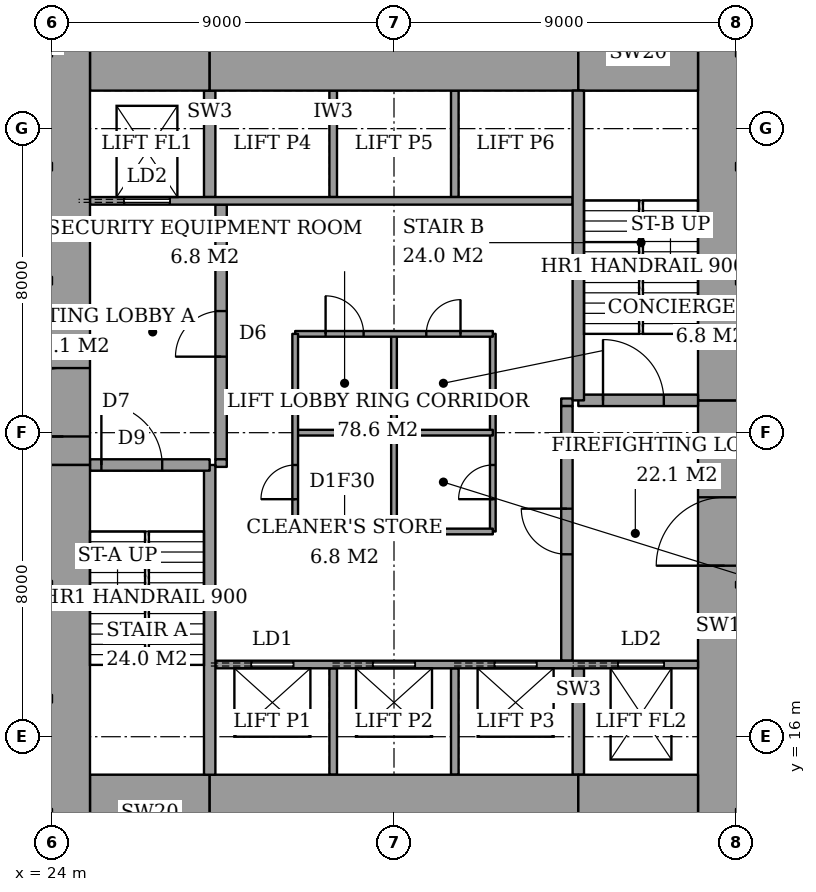
"""IFC4 building model, lengths in metres.
Left out: names, types, materials, properties, quantities, classifications, styles, units other than length and angle.
Written with IfcOpenShell. Run it as: python <this file> out.ifc"""

import sys

from ifc_helpers import new_model, si_unit, direction, frame, frame_2d, origin, place, context, subcontext, project, spatial, rectangle, extrude, element, fill, save


model = new_model("IFC4")
c1 = context("Model", 3, precision=1e-05, world=origin(), true_north=direction((0.0, 1.0)))
c2 = subcontext(c1, "Body", "Model", "MODEL_VIEW")
j1 = project(units=[si_unit("LENGTHUNIT", "METRE"), si_unit("PLANEANGLEUNIT", "RADIAN")], contexts=[c1])
p1 = place(None, origin())
s1 = spatial("IfcSite", under=j1, at=p1, CompositionType="ELEMENT")
p2 = place(p1, origin())
s2 = spatial("IfcBuilding", under=s1, at=p2, CompositionType="ELEMENT")
p3 = place(p2, frame((0.0, 0.0, 21.0)))
s3 = spatial("IfcBuildingStorey", under=s2, at=p3, CompositionType="ELEMENT", Elevation=21.0)
p4 = place(p3, frame((25.0, 14.0, 0.0), z_axis=(0.0, 0.0, 1.0), x_axis=(1.0, 0.0, 0.0)))
e1 = element("IfcWall", 1, at=p4, inside=s3, PredefinedType="SHEAR", context=c2, shape_type="SweptSolid", body=[
    extrude(rectangle(XDim=3.15, YDim=2.0, at=frame_2d((1.575, 0.0))), origin(), (0.0, 0.0, 1.0), 5.0),
])
p5 = place(p3, frame((28.15, 14.0, 0.0), z_axis=(0.0, 0.0, 1.0), x_axis=(1.0, 0.0, 0.0)))
e2 = element("IfcWall", 2, at=p5, inside=s3, PredefinedType="SHEAR", context=c2, shape_type="SweptSolid", body=[
    extrude(rectangle(XDim=9.7, YDim=2.0, at=frame_2d((4.85, 0.0))), origin(), (0.0, 0.0, 1.0), 5.0),
])
for number, where, z_axis, x_axis in (
    (3, (37.85, 14.0, 0.0), (0.0, 0.0, 1.0), (1.0, 0.0, 0.0)),
    (4, (25.0, 34.0, 0.0), (0.0, 0.0, 1.0), (1.0, 0.0, 0.0)),
):
    element("IfcWall", number, at=place(p3, frame(where, z_axis=z_axis, x_axis=x_axis)), inside=s3, PredefinedType="SHEAR", context=c2, shape_type="SweptSolid", body=[
        extrude(rectangle(XDim=3.15, YDim=2.0, at=frame_2d((1.575, 0.0))), origin(), (0.0, 0.0, 1.0), 5.0),
    ])
p6 = place(p3, frame((28.15, 34.0, 0.0), z_axis=(0.0, 0.0, 1.0), x_axis=(1.0, 0.0, 0.0)))
e5 = element("IfcWall", 5, at=p6, inside=s3, PredefinedType="SHEAR", context=c2, shape_type="SweptSolid", body=[
    extrude(rectangle(XDim=9.7, YDim=2.0, at=frame_2d((4.85, 0.0))), origin(), (0.0, 0.0, 1.0), 5.0),
])
p7 = place(p3, frame((37.85, 34.0, 0.0), z_axis=(0.0, 0.0, 1.0), x_axis=(1.0, 0.0, 0.0)))
e6 = element("IfcWall", 6, at=p7, inside=s3, PredefinedType="SHEAR", context=c2, shape_type="SweptSolid", body=[
    extrude(rectangle(XDim=3.15, YDim=2.0, at=frame_2d((1.575, 0.0))), origin(), (0.0, 0.0, 1.0), 5.0),
])
p8 = place(p3, frame((24.3, 13.0, 0.0), z_axis=(0.0, 0.0, 1.0), x_axis=(0.0, 1.0, 0.0)))
e7 = element("IfcWall", 7, at=p8, inside=s3, PredefinedType="SHEAR", context=c2, shape_type="SweptSolid", body=[
    extrude(rectangle(XDim=10.15, YDim=1.4, at=frame_2d((5.075, 0.0))), origin(), (0.0, 0.0, 1.0), 5.0),
])
p9 = place(p3, frame((24.3, 23.15, 0.0), z_axis=(0.0, 0.0, 1.0), x_axis=(0.0, 1.0, 0.0)))
e8 = element("IfcWall", 8, at=p9, inside=s3, PredefinedType="SHEAR", context=c2, shape_type="SweptSolid", body=[
    extrude(rectangle(XDim=11.85, YDim=1.4, at=frame_2d((5.925, 0.0))), origin(), (0.0, 0.0, 1.0), 5.0),
])
p10 = place(p9, frame((0.75, 0.0, 0.0)))
e9 = element("IfcOpeningElement", 9, at=p10, cuts=e8, PredefinedType="OPENING", context=c2, shape_type="SweptSolid", body=[
    extrude(rectangle(XDim=1.8, YDim=2.4, at=frame_2d((0.9, 1.2))), frame((0.0, 0.71, 0.0), z_axis=(0.0, -1.0, 0.0), x_axis=(1.0, 0.0, 0.0)), (0.0, 0.0, 1.0), 1.42),
])
p11 = place(p3, frame((41.7, 13.0, 0.0), z_axis=(0.0, 0.0, 1.0), x_axis=(0.0, 1.0, 0.0)))
e10 = element("IfcWall", 10, at=p11, inside=s3, PredefinedType="SHEAR", context=c2, shape_type="SweptSolid", body=[
    extrude(rectangle(XDim=11.85, YDim=1.4, at=frame_2d((5.925, 0.0))), origin(), (0.0, 0.0, 1.0), 5.0),
])
p12 = place(p11, frame((7.5, 0.0, 0.0)))
e11 = element("IfcOpeningElement", 11, at=p12, cuts=e10, PredefinedType="OPENING", context=c2, shape_type="SweptSolid", body=[
    extrude(rectangle(XDim=1.8, YDim=2.4, at=frame_2d((0.9, 1.2))), frame((0.0, 0.71, 0.0), z_axis=(0.0, -1.0, 0.0), x_axis=(1.0, 0.0, 0.0)), (0.0, 0.0, 1.0), 1.42),
])
p13 = place(p3, frame((41.7, 24.85, 0.0), z_axis=(0.0, 0.0, 1.0), x_axis=(0.0, 1.0, 0.0)))
e12 = element("IfcWall", 12, at=p13, inside=s3, PredefinedType="SHEAR", context=c2, shape_type="SweptSolid", body=[
    extrude(rectangle(XDim=10.15, YDim=1.4, at=frame_2d((5.075, 0.0))), origin(), (0.0, 0.0, 1.0), 5.0),
])
p14 = place(p3, frame((28.15, 15.0, 0.0), z_axis=(0.0, 0.0, 1.0), x_axis=(0.0, 1.0, 0.0)))
e13 = element("IfcWall", 13, at=p14, inside=s3, PredefinedType="SHEAR", context=c2, shape_type="SweptSolid", body=[
    extrude(rectangle(XDim=8.15, YDim=0.3, at=frame_2d((4.075, 0.0))), origin(), (0.0, 0.0, 1.0), 5.0),
])
p15 = place(p3, frame((25.0, 23.15, 0.0), z_axis=(0.0, 0.0, 1.0), x_axis=(1.0, 0.0, 0.0)))
e14 = element("IfcWall", 14, at=p15, inside=s3, PredefinedType="SHEAR", context=c2, shape_type="SweptSolid", body=[
    extrude(rectangle(XDim=3.15, YDim=0.3, at=frame_2d((1.575, 0.0))), origin(), (0.0, 0.0, 1.0), 5.0),
])
p16 = place(p15, frame((0.3, 0.0, 0.0)))
e15 = element("IfcOpeningElement", 15, at=p16, cuts=e14, PredefinedType="OPENING", context=c2, shape_type="SweptSolid", body=[
    extrude(rectangle(XDim=1.6, YDim=2.1, at=frame_2d((0.8, 1.05))), frame((0.0, 0.16, 0.0), z_axis=(0.0, -1.0, 0.0), x_axis=(1.0, 0.0, 0.0)), (0.0, 0.0, 1.0), 0.32),
])
p17 = place(p3, frame((37.85, 24.85, 0.0), z_axis=(0.0, 0.0, 1.0), x_axis=(0.0, 1.0, 0.0)))
e16 = element("IfcWall", 16, at=p17, inside=s3, PredefinedType="SHEAR", context=c2, shape_type="SweptSolid", body=[
    extrude(rectangle(XDim=8.15, YDim=0.3, at=frame_2d((4.075, 0.0))), origin(), (0.0, 0.0, 1.0), 5.0),
])
p18 = place(p3, frame((37.85, 24.85, 0.0), z_axis=(0.0, 0.0, 1.0), x_axis=(1.0, 0.0, 0.0)))
e17 = element("IfcWall", 17, at=p18, inside=s3, PredefinedType="SHEAR", context=c2, shape_type="SweptSolid", body=[
    extrude(rectangle(XDim=3.15, YDim=0.3, at=frame_2d((1.575, 0.0))), origin(), (0.0, 0.0, 1.0), 5.0),
])
p19 = place(p18, frame((0.65, 0.0, 0.0)))
e18 = element("IfcOpeningElement", 18, at=p19, cuts=e17, PredefinedType="OPENING", context=c2, shape_type="SweptSolid", body=[
    extrude(rectangle(XDim=1.6, YDim=2.1, at=frame_2d((0.8, 1.05))), frame((0.0, 0.16, 0.0), z_axis=(0.0, -1.0, 0.0), x_axis=(1.0, 0.0, 0.0)), (0.0, 0.0, 1.0), 0.32),
])
p20 = place(p3, frame((28.45, 23.3, 0.0), z_axis=(0.0, 0.0, 1.0), x_axis=(0.0, 1.0, 0.0)))
e19 = element("IfcWall", 19, at=p20, inside=s3, PredefinedType="PARTITIONING", context=c2, shape_type="SweptSolid", body=[
    extrude(rectangle(XDim=6.7, YDim=0.3, at=frame_2d((3.35, 0.0))), origin(), (0.0, 0.0, 1.0), 5.0),
])
p21 = place(p20, frame((2.7, 0.0, 0.0)))
e20 = element("IfcOpeningElement", 20, at=p21, cuts=e19, PredefinedType="OPENING", context=c2, shape_type="SweptSolid", body=[
    extrude(rectangle(XDim=1.2, YDim=2.1, at=frame_2d((0.6, 1.05))), frame((0.0, 0.16, 0.0), z_axis=(0.0, -1.0, 0.0), x_axis=(1.0, 0.0, 0.0)), (0.0, 0.0, 1.0), 0.32),
])
p22 = place(p3, frame((37.55, 18.0, 0.0), z_axis=(0.0, 0.0, 1.0), x_axis=(0.0, 1.0, 0.0)))
e21 = element("IfcWall", 21, at=p22, inside=s3, PredefinedType="PARTITIONING", context=c2, shape_type="SweptSolid", body=[
    extrude(rectangle(XDim=6.7, YDim=0.3, at=frame_2d((3.35, 0.0))), origin(), (0.0, 0.0, 1.0), 5.0),
])
p23 = place(p22, frame((2.8, 0.0, 0.0)))
e22 = element("IfcOpeningElement", 22, at=p23, cuts=e21, PredefinedType="OPENING", context=c2, shape_type="SweptSolid", body=[
    extrude(rectangle(XDim=1.2, YDim=2.1, at=frame_2d((0.6, 1.05))), frame((0.0, 0.16, 0.0), z_axis=(0.0, -1.0, 0.0), x_axis=(1.0, 0.0, 0.0)), (0.0, 0.0, 1.0), 0.32),
])
p24 = place(p3, frame((28.3, 17.9, 0.0), z_axis=(0.0, 0.0, 1.0), x_axis=(1.0, 0.0, 0.0)))
e23 = element("IfcWall", 23, at=p24, inside=s3, PredefinedType="PARTITIONING", context=c2, shape_type="SweptSolid", body=[
    extrude(rectangle(XDim=12.7, YDim=0.2, at=frame_2d((6.35, 0.0))), origin(), (0.0, 0.0, 1.0), 5.0),
])
p25 = place(p24, frame((0.95, 0.0, 0.0)))
e24 = element("IfcOpeningElement", 24, at=p25, cuts=e23, PredefinedType="OPENING", context=c2, shape_type="SweptSolid", body=[
    extrude(rectangle(XDim=1.1, YDim=2.1, at=frame_2d((0.55, 1.05))), frame((0.0, 0.11, 0.0), z_axis=(0.0, -1.0, 0.0), x_axis=(1.0, 0.0, 0.0)), (0.0, 0.0, 1.0), 0.22),
])
p26 = place(p24, frame((4.15, 0.0, 0.0)))
e25 = element("IfcOpeningElement", 25, at=p26, cuts=e23, PredefinedType="OPENING", context=c2, shape_type="SweptSolid", body=[
    extrude(rectangle(XDim=1.1, YDim=2.1, at=frame_2d((0.55, 1.05))), frame((0.0, 0.11, 0.0), z_axis=(0.0, -1.0, 0.0), x_axis=(1.0, 0.0, 0.0)), (0.0, 0.0, 1.0), 0.22),
])
p27 = place(p24, frame((7.35, 0.0, 0.0)))
e26 = element("IfcOpeningElement", 26, at=p27, cuts=e23, PredefinedType="OPENING", context=c2, shape_type="SweptSolid", body=[
    extrude(rectangle(XDim=1.1, YDim=2.1, at=frame_2d((0.55, 1.05))), frame((0.0, 0.11, 0.0), z_axis=(0.0, -1.0, 0.0), x_axis=(1.0, 0.0, 0.0)), (0.0, 0.0, 1.0), 0.22),
])
p28 = place(p24, frame((10.6, 0.0, 0.0)))
e27 = element("IfcOpeningElement", 27, at=p28, cuts=e23, PredefinedType="OPENING", context=c2, shape_type="SweptSolid", body=[
    extrude(rectangle(XDim=1.2, YDim=2.1, at=frame_2d((0.6, 1.05))), frame((0.0, 0.11, 0.0), z_axis=(0.0, -1.0, 0.0), x_axis=(1.0, 0.0, 0.0)), (0.0, 0.0, 1.0), 0.22),
])
p29 = place(p3, frame((25.0, 30.1, 0.0), z_axis=(0.0, 0.0, 1.0), x_axis=(1.0, 0.0, 0.0)))
e28 = element("IfcWall", 28, at=p29, inside=s3, PredefinedType="PARTITIONING", context=c2, shape_type="SweptSolid", body=[
    extrude(rectangle(XDim=12.7, YDim=0.2, at=frame_2d((6.35, 0.0))), origin(), (0.0, 0.0, 1.0), 5.0),
])
p30 = place(p29, frame((0.9, 0.0, 0.0)))
e29 = element("IfcOpeningElement", 29, at=p30, cuts=e28, PredefinedType="OPENING", context=c2, shape_type="SweptSolid", body=[
    extrude(rectangle(XDim=1.2, YDim=2.1, at=frame_2d((0.6, 1.05))), frame((0.0, 0.11, 0.0), z_axis=(0.0, -1.0, 0.0), x_axis=(1.0, 0.0, 0.0)), (0.0, 0.0, 1.0), 0.22),
])
for number, where, z_axis, x_axis in (
    (30, (31.4, 15.0, 0.0), (0.0, 0.0, 1.0), (0.0, 1.0, 0.0)),
    (31, (34.6, 15.0, 0.0), (0.0, 0.0, 1.0), (0.0, 1.0, 0.0)),
):
    element("IfcWall", number, at=place(p3, frame(where, z_axis=z_axis, x_axis=x_axis)), inside=s3, PredefinedType="PARTITIONING", context=c2, shape_type="SweptSolid", body=[
        extrude(rectangle(XDim=2.8, YDim=0.2, at=frame_2d((1.4, 0.0))), origin(), (0.0, 0.0, 1.0), 5.0),
    ])
p31 = place(p3, frame((37.85, 15.0, 0.0), z_axis=(0.0, 0.0, 1.0), x_axis=(0.0, 1.0, 0.0)))
e32 = element("IfcWall", 32, at=p31, inside=s3, PredefinedType="SHEAR", context=c2, shape_type="SweptSolid", body=[
    extrude(rectangle(XDim=2.8, YDim=0.3, at=frame_2d((1.4, 0.0))), origin(), (0.0, 0.0, 1.0), 5.0),
])
for number, where, z_axis, x_axis in (
    (33, (31.4, 30.2, 0.0), (0.0, 0.0, 1.0), (0.0, 1.0, 0.0)),
    (34, (34.6, 30.2, 0.0), (0.0, 0.0, 1.0), (0.0, 1.0, 0.0)),
):
    element("IfcWall", number, at=place(p3, frame(where, z_axis=z_axis, x_axis=x_axis)), inside=s3, PredefinedType="PARTITIONING", context=c2, shape_type="SweptSolid", body=[
        extrude(rectangle(XDim=2.8, YDim=0.2, at=frame_2d((1.4, 0.0))), origin(), (0.0, 0.0, 1.0), 5.0),
    ])
p32 = place(p3, frame((28.15, 30.2, 0.0), z_axis=(0.0, 0.0, 1.0), x_axis=(0.0, 1.0, 0.0)))
e35 = element("IfcWall", 35, at=p32, inside=s3, PredefinedType="SHEAR", context=c2, shape_type="SweptSolid", body=[
    extrude(rectangle(XDim=2.8, YDim=0.3, at=frame_2d((1.4, 0.0))), origin(), (0.0, 0.0, 1.0), 5.0),
])
for number, where, z_axis, x_axis in (
    (36, (28.3, 23.2, 0.0), (0.0, 0.0, 1.0), (1.0, 0.0, 0.0)),
    (37, (37.4, 24.8, 0.0), (0.0, 0.0, 1.0), (1.0, 0.0, 0.0)),
):
    element("IfcWall", number, at=place(p3, frame(where, z_axis=z_axis, x_axis=x_axis)), inside=s3, PredefinedType="PARTITIONING", context=c2, shape_type="SweptSolid", body=[
        extrude(rectangle(XDim=0.3, YDim=0.2, at=frame_2d((0.15, 0.0))), origin(), (0.0, 0.0, 1.0), 5.0),
    ])
p33 = place(p3, frame((30.4, 21.4, 0.0), z_axis=(0.0, 0.0, 1.0), x_axis=(1.0, 0.0, 0.0)))
e38 = element("IfcWall", 38, at=p33, inside=s3, PredefinedType="PARTITIONING", context=c2, shape_type="SweptSolid", body=[
    extrude(rectangle(XDim=5.2, YDim=0.15, at=frame_2d((2.6, 0.0))), origin(), (0.0, 0.0, 1.0), 4.65),
])
p34 = place(p3, frame((30.4, 26.6, 0.0), z_axis=(0.0, 0.0, 1.0), x_axis=(1.0, 0.0, 0.0)))
e39 = element("IfcWall", 39, at=p34, inside=s3, PredefinedType="PARTITIONING", context=c2, shape_type="SweptSolid", body=[
    extrude(rectangle(XDim=5.2, YDim=0.15, at=frame_2d((2.6, 0.0))), origin(), (0.0, 0.0, 1.0), 4.65),
])
p35 = place(p34, frame((0.8, 0.0, 0.0)))
e40 = element("IfcOpeningElement", 40, at=p35, cuts=e39, PredefinedType="OPENING", context=c2, shape_type="SweptSolid", body=[
    extrude(rectangle(XDim=1.0, YDim=2.1, at=frame_2d((0.5, 1.05))), frame((0.0, 0.085, 0.0), z_axis=(0.0, -1.0, 0.0), x_axis=(1.0, 0.0, 0.0)), (0.0, 0.0, 1.0), 0.17),
])
p36 = place(p34, frame((3.45, 0.0, 0.0)))
e41 = element("IfcOpeningElement", 41, at=p36, cuts=e39, PredefinedType="OPENING", context=c2, shape_type="SweptSolid", body=[
    extrude(rectangle(XDim=0.9, YDim=2.1, at=frame_2d((0.45, 1.05))), frame((0.0, 0.085, 0.0), z_axis=(0.0, -1.0, 0.0), x_axis=(1.0, 0.0, 0.0)), (0.0, 0.0, 1.0), 0.17),
])
p37 = place(p3, frame((30.4, 21.4, 0.0), z_axis=(0.0, 0.0, 1.0), x_axis=(0.0, 1.0, 0.0)))
e42 = element("IfcWall", 42, at=p37, inside=s3, PredefinedType="PARTITIONING", context=c2, shape_type="SweptSolid", body=[
    extrude(rectangle(XDim=5.2, YDim=0.15, at=frame_2d((2.6, 0.0))), origin(), (0.0, 0.0, 1.0), 4.65),
])
p38 = place(p37, frame((0.85, 0.0, 0.0)))
e43 = element("IfcOpeningElement", 43, at=p38, cuts=e42, PredefinedType="OPENING", context=c2, shape_type="SweptSolid", body=[
    extrude(rectangle(XDim=0.9, YDim=2.1, at=frame_2d((0.45, 1.05))), frame((0.0, 0.085, 0.0), z_axis=(0.0, -1.0, 0.0), x_axis=(1.0, 0.0, 0.0)), (0.0, 0.0, 1.0), 0.17),
])
p39 = place(p3, frame((35.6, 21.4, 0.0), z_axis=(0.0, 0.0, 1.0), x_axis=(0.0, 1.0, 0.0)))
e44 = element("IfcWall", 44, at=p39, inside=s3, PredefinedType="PARTITIONING", context=c2, shape_type="SweptSolid", body=[
    extrude(rectangle(XDim=5.2, YDim=0.15, at=frame_2d((2.6, 0.0))), origin(), (0.0, 0.0, 1.0), 4.65),
])
p40 = place(p39, frame((0.85, 0.0, 0.0)))
e45 = element("IfcOpeningElement", 45, at=p40, cuts=e44, PredefinedType="OPENING", context=c2, shape_type="SweptSolid", body=[
    extrude(rectangle(XDim=0.9, YDim=2.1, at=frame_2d((0.45, 1.05))), frame((0.0, 0.085, 0.0), z_axis=(0.0, -1.0, 0.0), x_axis=(1.0, 0.0, 0.0)), (0.0, 0.0, 1.0), 0.17),
])
for number, where, z_axis, x_axis in (
    (46, (30.4, 24.0, 0.0), (0.0, 0.0, 1.0), (1.0, 0.0, 0.0)),
    (47, (33.0, 21.4, 0.0), (0.0, 0.0, 1.0), (0.0, 1.0, 0.0)),
):
    element("IfcWall", number, at=place(p3, frame(where, z_axis=z_axis, x_axis=x_axis)), inside=s3, PredefinedType="PARTITIONING", context=c2, shape_type="SweptSolid", body=[
        extrude(rectangle(XDim=5.2, YDim=0.15, at=frame_2d((2.6, 0.0))), origin(), (0.0, 0.0, 1.0), 4.65),
    ])
p41 = place(p16, origin())
e48 = element("IfcDoor", 48, at=p41, inside=s3, OperationType="DOUBLE_DOOR_SINGLE_SWING", PredefinedType="DOOR", context=c2, shape_type="SweptSolid", body=[
    extrude(rectangle(XDim=1.6, YDim=2.1, at=frame_2d((0.8, 1.05))), frame((0.0, 0.025, 0.0), z_axis=(0.0, -1.0, 0.0), x_axis=(1.0, 0.0, 0.0)), (0.0, 0.0, 1.0), 0.05),
])
fill(e15, e48)
p42 = place(p19, origin())
e49 = element("IfcDoor", 49, at=p42, inside=s3, OperationType="DOUBLE_DOOR_SINGLE_SWING", PredefinedType="DOOR", context=c2, shape_type="SweptSolid", body=[
    extrude(rectangle(XDim=1.6, YDim=2.1, at=frame_2d((0.8, 1.05))), frame((0.0, 0.025, 0.0), z_axis=(0.0, -1.0, 0.0), x_axis=(1.0, 0.0, 0.0)), (0.0, 0.0, 1.0), 0.05),
])
fill(e18, e49)
p43 = place(p21, origin())
e50 = element("IfcDoor", 50, at=p43, inside=s3, OperationType="SINGLE_SWING_RIGHT", PredefinedType="DOOR", context=c2, shape_type="SweptSolid", body=[
    extrude(rectangle(XDim=1.2, YDim=2.1, at=frame_2d((0.6, 1.05))), frame((0.0, 0.025, 0.0), z_axis=(0.0, -1.0, 0.0), x_axis=(1.0, 0.0, 0.0)), (0.0, 0.0, 1.0), 0.05),
])
fill(e20, e50)
p44 = place(p23, origin())
e51 = element("IfcDoor", 51, at=p44, inside=s3, OperationType="SINGLE_SWING_LEFT", PredefinedType="DOOR", context=c2, shape_type="SweptSolid", body=[
    extrude(rectangle(XDim=1.2, YDim=2.1, at=frame_2d((0.6, 1.05))), frame((0.0, 0.025, 0.0), z_axis=(0.0, -1.0, 0.0), x_axis=(1.0, 0.0, 0.0)), (0.0, 0.0, 1.0), 0.05),
])
fill(e22, e51)
p45 = place(p10, origin())
e52 = element("IfcDoor", 52, at=p45, inside=s3, OperationType="DOUBLE_DOOR_DOUBLE_SWING", PredefinedType="DOOR", context=c2, shape_type="SweptSolid", body=[
    extrude(rectangle(XDim=1.8, YDim=2.4, at=frame_2d((0.9, 1.2))), frame((0.0, 0.025, 0.0), z_axis=(0.0, -1.0, 0.0), x_axis=(1.0, 0.0, 0.0)), (0.0, 0.0, 1.0), 0.05),
])
fill(e9, e52)
p46 = place(p12, origin())
e53 = element("IfcDoor", 53, at=p46, inside=s3, OperationType="DOUBLE_DOOR_DOUBLE_SWING", PredefinedType="DOOR", context=c2, shape_type="SweptSolid", body=[
    extrude(rectangle(XDim=1.8, YDim=2.4, at=frame_2d((0.9, 1.2))), frame((0.0, 0.025, 0.0), z_axis=(0.0, -1.0, 0.0), x_axis=(1.0, 0.0, 0.0)), (0.0, 0.0, 1.0), 0.05),
])
fill(e11, e53)
p47 = place(p38, origin())
e54 = element("IfcDoor", 54, at=p47, inside=s3, OperationType="SINGLE_SWING_RIGHT", PredefinedType="DOOR", context=c2, shape_type="SweptSolid", body=[
    extrude(rectangle(XDim=0.9, YDim=2.1, at=frame_2d((0.45, 1.05))), frame((0.0, 0.025, 0.0), z_axis=(0.0, -1.0, 0.0), x_axis=(1.0, 0.0, 0.0)), (0.0, 0.0, 1.0), 0.05),
])
fill(e43, e54)
p48 = place(p40, origin())
e55 = element("IfcDoor", 55, at=p48, inside=s3, OperationType="SINGLE_SWING_RIGHT", PredefinedType="DOOR", context=c2, shape_type="SweptSolid", body=[
    extrude(rectangle(XDim=0.9, YDim=2.1, at=frame_2d((0.45, 1.05))), frame((0.0, 0.025, 0.0), z_axis=(0.0, -1.0, 0.0), x_axis=(1.0, 0.0, 0.0)), (0.0, 0.0, 1.0), 0.05),
])
fill(e45, e55)
p49 = place(p35, origin())
e56 = element("IfcDoor", 56, at=p49, inside=s3, OperationType="SINGLE_SWING_RIGHT", PredefinedType="DOOR", context=c2, shape_type="SweptSolid", body=[
    extrude(rectangle(XDim=1.0, YDim=2.1, at=frame_2d((0.5, 1.05))), frame((0.0, 0.025, 0.0), z_axis=(0.0, -1.0, 0.0), x_axis=(1.0, 0.0, 0.0)), (0.0, 0.0, 1.0), 0.05),
])
fill(e40, e56)
p50 = place(p36, origin())
e57 = element("IfcDoor", 57, at=p50, inside=s3, OperationType="SINGLE_SWING_LEFT", PredefinedType="DOOR", context=c2, shape_type="SweptSolid", body=[
    extrude(rectangle(XDim=0.9, YDim=2.1, at=frame_2d((0.45, 1.05))), frame((0.0, 0.025, 0.0), z_axis=(0.0, -1.0, 0.0), x_axis=(1.0, 0.0, 0.0)), (0.0, 0.0, 1.0), 0.05),
])
fill(e41, e57)
p51 = place(p25, origin())
e58 = element("IfcDoor", 58, at=p51, inside=s3, OperationType="SLIDING_TO_LEFT", PredefinedType="DOOR", context=c2, shape_type="SweptSolid", body=[
    extrude(rectangle(XDim=1.1, YDim=2.1, at=frame_2d((0.55, 1.05))), frame((0.0, 0.025, 0.0), z_axis=(0.0, -1.0, 0.0), x_axis=(1.0, 0.0, 0.0)), (0.0, 0.0, 1.0), 0.05),
])
fill(e24, e58)
p52 = place(p26, origin())
e59 = element("IfcDoor", 59, at=p52, inside=s3, OperationType="SLIDING_TO_LEFT", PredefinedType="DOOR", context=c2, shape_type="SweptSolid", body=[
    extrude(rectangle(XDim=1.1, YDim=2.1, at=frame_2d((0.55, 1.05))), frame((0.0, 0.025, 0.0), z_axis=(0.0, -1.0, 0.0), x_axis=(1.0, 0.0, 0.0)), (0.0, 0.0, 1.0), 0.05),
])
fill(e25, e59)
p53 = place(p27, origin())
e60 = element("IfcDoor", 60, at=p53, inside=s3, OperationType="SLIDING_TO_LEFT", PredefinedType="DOOR", context=c2, shape_type="SweptSolid", body=[
    extrude(rectangle(XDim=1.1, YDim=2.1, at=frame_2d((0.55, 1.05))), frame((0.0, 0.025, 0.0), z_axis=(0.0, -1.0, 0.0), x_axis=(1.0, 0.0, 0.0)), (0.0, 0.0, 1.0), 0.05),
])
fill(e26, e60)
p54 = place(p30, origin())
e61 = element("IfcDoor", 61, at=p54, inside=s3, OperationType="SLIDING_TO_LEFT", PredefinedType="DOOR", context=c2, shape_type="SweptSolid", body=[
    extrude(rectangle(XDim=1.2, YDim=2.1, at=frame_2d((0.6, 1.05))), frame((0.0, 0.025, 0.0), z_axis=(0.0, -1.0, 0.0), x_axis=(1.0, 0.0, 0.0)), (0.0, 0.0, 1.0), 0.05),
])
fill(e29, e61)
p55 = place(p28, origin())
e62 = element("IfcDoor", 62, at=p55, inside=s3, OperationType="SLIDING_TO_LEFT", PredefinedType="DOOR", context=c2, shape_type="SweptSolid", body=[
    extrude(rectangle(XDim=1.2, YDim=2.1, at=frame_2d((0.6, 1.05))), frame((0.0, 0.025, 0.0), z_axis=(0.0, -1.0, 0.0), x_axis=(1.0, 0.0, 0.0)), (0.0, 0.0, 1.0), 0.05),
])
fill(e27, e62)
save(model, sys.argv[1])
